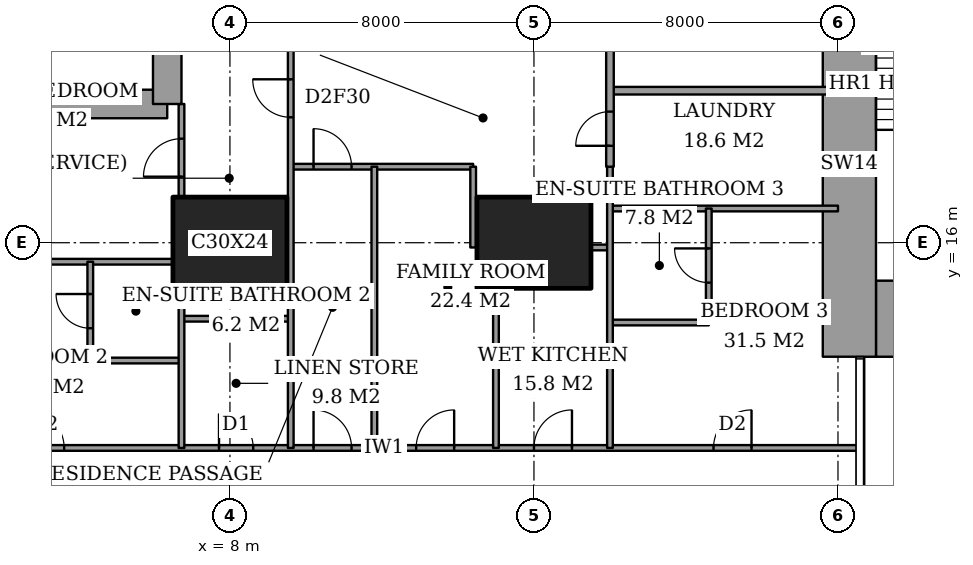
"""IFC4 building model, lengths in metres.
Left out: names, types, materials, properties, quantities, classifications, styles, units other than length and angle.
Written with IfcOpenShell. Run it as: python <this file> out.ifc"""

import sys

from ifc_helpers import new_model, si_unit, direction, frame, frame_2d, origin, origin_2d, place, context, subcontext, project, spatial, rectangle, extrude, element, fill, save


model = new_model("IFC4")
c1 = context("Model", 3, precision=1e-05, world=origin(), true_north=direction((0.0, 1.0)))
c2 = subcontext(c1, "Body", "Model", "MODEL_VIEW")
j1 = project(units=[si_unit("LENGTHUNIT", "METRE"), si_unit("PLANEANGLEUNIT", "RADIAN")], contexts=[c1])
p1 = place(None, origin())
s1 = spatial("IfcSite", under=j1, at=p1, CompositionType="ELEMENT")
p2 = place(p1, origin())
s2 = spatial("IfcBuilding", under=s1, at=p2, CompositionType="ELEMENT")
p3 = place(p2, frame((0.0, 0.0, 62.0)))
s3 = spatial("IfcBuildingStorey", under=s2, at=p3, CompositionType="ELEMENT", Elevation=62.0)
for number, where, z_axis, x_axis in (
    (1, (8.0, 16.0, 0.0), (0.0, 0.0, 1.0), (1.0, 0.0, 0.0)),
    (2, (16.0, 16.0, 0.0), (0.0, 0.0, 1.0), (1.0, 0.0, 0.0)),
):
    element("IfcColumn", number, at=place(p3, frame(where, z_axis=z_axis, x_axis=x_axis)), inside=s3, PredefinedType="COLUMN", context=c2, shape_type="SweptSolid", body=[
        extrude(rectangle(XDim=3.0, YDim=2.4, at=origin_2d()), origin(), (0.0, 0.0, 1.0), 3.6),
    ])
p4 = place(p3, frame((25.0, 14.0, 0.0), z_axis=(0.0, 0.0, 1.0), x_axis=(1.0, 0.0, 0.0)))
e3 = element("IfcWall", 3, at=p4, inside=s3, PredefinedType="SHEAR", context=c2, shape_type="SweptSolid", body=[
    extrude(rectangle(XDim=3.15, YDim=2.0, at=frame_2d((1.575, 0.0))), origin(), (0.0, 0.0, 1.0), 3.6),
])
p5 = place(p3, frame((24.3, 13.0, 0.0), z_axis=(0.0, 0.0, 1.0), x_axis=(0.0, 1.0, 0.0)))
e4 = element("IfcWall", 4, at=p5, inside=s3, PredefinedType="SHEAR", context=c2, shape_type="SweptSolid", body=[
    extrude(rectangle(XDim=10.15, YDim=1.4, at=frame_2d((5.075, 0.0))), origin(), (0.0, 0.0, 1.0), 3.6),
])
p6 = place(p3, frame((1.9, 19.65, 0.0), z_axis=(0.0, 0.0, 1.0), x_axis=(1.0, 0.0, 0.0)))
e5 = element("IfcWall", 5, at=p6, inside=s3, PredefinedType="SHEAR", context=c2, shape_type="SweptSolid", body=[
    extrude(rectangle(XDim=4.45, YDim=0.75, at=frame_2d((2.225, 0.0))), origin(), (0.0, 0.0, 1.0), 3.6),
])
p7 = place(p3, frame((6.35, 19.65, 0.0), z_axis=(0.0, 0.0, 1.0), x_axis=(0.0, 1.0, 0.0)))
e6 = element("IfcWall", 6, at=p7, inside=s3, PredefinedType="SHEAR", context=c2, shape_type="SweptSolid", body=[
    extrude(rectangle(XDim=8.7, YDim=0.75, at=frame_2d((4.35, 0.0))), origin(), (0.0, 0.0, 1.0), 3.6),
])
p8 = place(p7, frame((6.725, 0.0, 0.0)))
e7 = element("IfcOpeningElement", 7, at=p8, cuts=e6, PredefinedType="OPENING", context=c2, shape_type="SweptSolid", body=[
    extrude(rectangle(XDim=1.0, YDim=2.1, at=frame_2d((0.5, 1.05))), frame((0.0, 0.385, 0.0), z_axis=(0.0, -1.0, 0.0), x_axis=(1.0, 0.0, 0.0)), (0.0, 0.0, 1.0), 0.77),
])
p9 = place(p3, frame((-0.45, 10.6, 0.0), z_axis=(0.0, 0.0, 1.0), x_axis=(1.0, 0.0, 0.0)))
e8 = element("IfcWall", 8, at=p9, inside=s3, PredefinedType="PARTITIONING", context=c2, shape_type="SweptSolid", body=[
    extrude(rectangle(XDim=25.011, YDim=0.15, at=frame_2d((12.505, 0.0))), origin(), (0.0, 0.0, 1.0), 3.35),
])
p10 = place(p9, frame((10.65, 0.0, 0.0)))
e9 = element("IfcOpeningElement", 9, at=p10, cuts=e8, PredefinedType="OPENING", context=c2, shape_type="SweptSolid", body=[
    extrude(rectangle(XDim=1.0, YDim=2.1, at=frame_2d((0.5, 1.05))), frame((0.0, 0.085, 0.0), z_axis=(0.0, -1.0, 0.0), x_axis=(1.0, 0.0, 0.0)), (0.0, 0.0, 1.0), 0.17),
])
p11 = place(p9, frame((3.087, 0.0, 0.0)))
e10 = element("IfcOpeningElement", 10, at=p11, cuts=e8, PredefinedType="OPENING", context=c2, shape_type="SweptSolid", body=[
    extrude(rectangle(XDim=1.0, YDim=2.1, at=frame_2d((0.5, 1.05))), frame((0.0, 0.085, 0.0), z_axis=(0.0, -1.0, 0.0), x_axis=(1.0, 0.0, 0.0)), (0.0, 0.0, 1.0), 0.17),
])
p12 = place(p9, frame((8.163, 0.0, 0.0)))
e11 = element("IfcOpeningElement", 11, at=p12, cuts=e8, PredefinedType="OPENING", context=c2, shape_type="SweptSolid", body=[
    extrude(rectangle(XDim=0.9, YDim=2.1, at=frame_2d((0.45, 1.05))), frame((0.0, 0.085, 0.0), z_axis=(0.0, -1.0, 0.0), x_axis=(1.0, 0.0, 0.0)), (0.0, 0.0, 1.0), 0.17),
])
p13 = place(p9, frame((13.35, 0.0, 0.0)))
e12 = element("IfcOpeningElement", 12, at=p13, cuts=e8, PredefinedType="OPENING", context=c2, shape_type="SweptSolid", body=[
    extrude(rectangle(XDim=1.0, YDim=2.1, at=frame_2d((0.5, 1.05))), frame((0.0, 0.085, 0.0), z_axis=(0.0, -1.0, 0.0), x_axis=(1.0, 0.0, 0.0)), (0.0, 0.0, 1.0), 0.17),
])
p14 = place(p9, frame((16.45, 0.0, 0.0)))
e13 = element("IfcOpeningElement", 13, at=p14, cuts=e8, PredefinedType="OPENING", context=c2, shape_type="SweptSolid", body=[
    extrude(rectangle(XDim=1.0, YDim=2.1, at=frame_2d((0.5, 1.05))), frame((0.0, 0.085, 0.0), z_axis=(0.0, -1.0, 0.0), x_axis=(1.0, 0.0, 0.0)), (0.0, 0.0, 1.0), 0.17),
])
p15 = place(p9, frame((21.175, 0.0, 0.0)))
e14 = element("IfcOpeningElement", 14, at=p15, cuts=e8, PredefinedType="OPENING", context=c2, shape_type="SweptSolid", body=[
    extrude(rectangle(XDim=1.0, YDim=2.1, at=frame_2d((0.5, 1.05))), frame((0.0, 0.085, 0.0), z_axis=(0.0, -1.0, 0.0), x_axis=(1.0, 0.0, 0.0)), (0.0, 0.0, 1.0), 0.17),
])
p16 = place(p3, frame((4.325, 12.9, 0.0), z_axis=(0.0, 0.0, 1.0), x_axis=(1.0, 0.0, 0.0)))
e15 = element("IfcWall", 15, at=p16, inside=s3, PredefinedType="PARTITIONING", context=c2, shape_type="SweptSolid", body=[
    extrude(rectangle(XDim=2.4, YDim=0.15, at=frame_2d((1.2, 0.0))), origin(), (0.0, 0.0, 1.0), 3.35),
])
p17 = place(p3, frame((18.0, 13.9, 0.0), z_axis=(0.0, 0.0, 1.0), x_axis=(1.0, 0.0, 0.0)))
e16 = element("IfcWall", 16, at=p17, inside=s3, PredefinedType="PARTITIONING", context=c2, shape_type="SweptSolid", body=[
    extrude(rectangle(XDim=2.6, YDim=0.15, at=frame_2d((1.3, 0.0))), origin(), (0.0, 0.0, 1.0), 3.35),
])
p18 = place(p3, frame((6.725, 14.0, 0.0), z_axis=(0.0, 0.0, 1.0), x_axis=(1.0, 0.0, 0.0)))
e17 = element("IfcWall", 17, at=p18, inside=s3, PredefinedType="PARTITIONING", context=c2, shape_type="SweptSolid", body=[
    extrude(rectangle(XDim=2.875, YDim=0.15, at=frame_2d((1.438, 0.0))), origin(), (0.0, 0.0, 1.0), 3.35),
])
p19 = place(p3, frame((1.35, 15.5, 0.0), z_axis=(0.0, 0.0, 1.0), x_axis=(1.0, 0.0, 0.0)))
e18 = element("IfcWall", 18, at=p19, inside=s3, PredefinedType="PARTITIONING", context=c2, shape_type="SweptSolid", body=[
    extrude(rectangle(XDim=5.15, YDim=0.15, at=frame_2d((2.575, 0.0))), origin(), (0.0, 0.0, 1.0), 3.35),
])
p20 = place(p3, frame((17.5, 15.875, 0.0), z_axis=(0.0, 0.0, 1.0), x_axis=(1.0, 0.0, 0.0)))
e19 = element("IfcWall", 19, at=p20, inside=s3, PredefinedType="PARTITIONING", context=c2, shape_type="SweptSolid", body=[
    extrude(rectangle(XDim=0.5, YDim=0.15, at=frame_2d((0.25, 0.0))), origin(), (0.0, 0.0, 1.0), 2.634),
])
p21 = place(p3, frame((18.0, 16.9, 0.0), z_axis=(0.0, 0.0, 1.0), x_axis=(1.0, 0.0, 0.0)))
e20 = element("IfcWall", 20, at=p21, inside=s3, PredefinedType="PARTITIONING", context=c2, shape_type="SweptSolid", body=[
    extrude(rectangle(XDim=6.0, YDim=0.15, at=frame_2d((3.0, 0.0))), origin(), (0.0, 0.0, 1.0), 3.35),
])
p22 = place(p3, frame((9.6, 18.0, 0.0), z_axis=(0.0, 0.0, 1.0), x_axis=(1.0, 0.0, 0.0)))
e21 = element("IfcWall", 21, at=p22, inside=s3, PredefinedType="PARTITIONING", context=c2, shape_type="SweptSolid", body=[
    extrude(rectangle(XDim=4.8, YDim=0.15, at=frame_2d((2.4, 0.0))), origin(), (0.0, 0.0, 1.0), 3.35),
])
p23 = place(p22, frame((0.6, 0.0, 0.0)))
e22 = element("IfcOpeningElement", 22, at=p23, cuts=e21, PredefinedType="OPENING", context=c2, shape_type="SweptSolid", body=[
    extrude(rectangle(XDim=1.0, YDim=2.1, at=frame_2d((0.5, 1.05))), frame((0.0, 0.085, 0.0), z_axis=(0.0, -1.0, 0.0), x_axis=(1.0, 0.0, 0.0)), (0.0, 0.0, 1.0), 0.17),
])
p24 = place(p3, frame((18.0, 20.0, 0.0), z_axis=(0.0, 0.0, 1.0), x_axis=(1.0, 0.0, 0.0)))
e23 = element("IfcWall", 23, at=p24, inside=s3, PredefinedType="PARTITIONING", context=c2, shape_type="SweptSolid", body=[
    extrude(rectangle(XDim=6.0, YDim=0.2, at=frame_2d((3.0, 0.0))), origin(), (0.0, 0.0, 1.0), 3.35),
])
p25 = place(p3, frame((4.325, 12.9, 0.0), z_axis=(0.0, 0.0, 1.0), x_axis=(0.0, 1.0, 0.0)))
e24 = element("IfcWall", 24, at=p25, inside=s3, PredefinedType="PARTITIONING", context=c2, shape_type="SweptSolid", body=[
    extrude(rectangle(XDim=2.6, YDim=0.15, at=frame_2d((1.3, 0.0))), origin(), (0.0, 0.0, 1.0), 3.35),
])
p26 = place(p25, frame((0.85, 0.0, 0.0)))
e25 = element("IfcOpeningElement", 25, at=p26, cuts=e24, PredefinedType="OPENING", context=c2, shape_type="SweptSolid", body=[
    extrude(rectangle(XDim=0.9, YDim=2.1, at=frame_2d((0.45, 1.05))), frame((0.0, 0.085, 0.0), z_axis=(0.0, -1.0, 0.0), x_axis=(1.0, 0.0, 0.0)), (0.0, 0.0, 1.0), 0.17),
])
p27 = place(p3, frame((6.725, 10.6, 0.0), z_axis=(0.0, 0.0, 1.0), x_axis=(0.0, 1.0, 0.0)))
e26 = element("IfcWall", 26, at=p27, inside=s3, PredefinedType="PARTITIONING", context=c2, shape_type="SweptSolid", body=[
    extrude(rectangle(XDim=4.2, YDim=0.15, at=frame_2d((2.1, 0.0))), origin(), (0.0, 0.0, 1.0), 3.35),
])
p28 = place(p3, frame((6.725, 17.2, 0.0), z_axis=(0.0, 0.0, 1.0), x_axis=(0.0, 1.0, 0.0)))
e27 = element("IfcWall", 27, at=p28, inside=s3, PredefinedType="PARTITIONING", context=c2, shape_type="SweptSolid", body=[
    extrude(rectangle(XDim=2.45, YDim=0.15, at=frame_2d((1.225, 0.0))), origin(), (0.0, 0.0, 1.0), 3.35),
])
p29 = place(p28, frame((0.538, 0.0, 0.0)))
e28 = element("IfcOpeningElement", 28, at=p29, cuts=e27, PredefinedType="OPENING", context=c2, shape_type="SweptSolid", body=[
    extrude(rectangle(XDim=1.0, YDim=2.1, at=frame_2d((0.5, 1.05))), frame((0.0, 0.085, 0.0), z_axis=(0.0, -1.0, 0.0), x_axis=(1.0, 0.0, 0.0)), (0.0, 0.0, 1.0), 0.17),
])
p30 = place(p3, frame((9.6, 10.6, 0.0), z_axis=(0.0, 0.0, 1.0), x_axis=(0.0, 1.0, 0.0)))
e29 = element("IfcWall", 29, at=p30, inside=s3, PredefinedType="PARTITIONING", context=c2, shape_type="SweptSolid", body=[
    extrude(rectangle(XDim=11.0, YDim=0.15, at=frame_2d((5.5, 0.0))), origin(), (0.0, 0.0, 1.0), 3.35),
])
p31 = place(p30, frame((8.7, 0.0, 0.0)))
e30 = element("IfcOpeningElement", 30, at=p31, cuts=e29, PredefinedType="OPENING", context=c2, shape_type="SweptSolid", body=[
    extrude(rectangle(XDim=1.0, YDim=2.1, at=frame_2d((0.5, 1.05))), frame((0.0, 0.085, 0.0), z_axis=(0.0, -1.0, 0.0), x_axis=(1.0, 0.0, 0.0)), (0.0, 0.0, 1.0), 0.17),
])
p32 = place(p3, frame((11.8, 10.6, 0.0), z_axis=(0.0, 0.0, 1.0), x_axis=(0.0, 1.0, 0.0)))
e31 = element("IfcWall", 31, at=p32, inside=s3, PredefinedType="PARTITIONING", context=c2, shape_type="SweptSolid", body=[
    extrude(rectangle(XDim=7.4, YDim=0.15, at=frame_2d((3.7, 0.0))), origin(), (0.0, 0.0, 1.0), 3.35),
])
p33 = place(p3, frame((14.4, 15.875, 0.0), z_axis=(0.0, 0.0, 1.0), x_axis=(0.0, 1.0, 0.0)))
e32 = element("IfcWall", 32, at=p33, inside=s3, PredefinedType="PARTITIONING", context=c2, shape_type="SweptSolid", body=[
    extrude(rectangle(XDim=2.125, YDim=0.15, at=frame_2d((1.062, 0.0))), origin(), (0.0, 0.0, 1.0), 3.35),
])
p34 = place(p3, frame((15.0, 10.6, 0.0), z_axis=(0.0, 0.0, 1.0), x_axis=(0.0, 1.0, 0.0)))
e33 = element("IfcWall", 33, at=p34, inside=s3, PredefinedType="PARTITIONING", context=c2, shape_type="SweptSolid", body=[
    extrude(rectangle(XDim=4.2, YDim=0.15, at=frame_2d((2.1, 0.0))), origin(), (0.0, 0.0, 1.0), 3.35),
])
p35 = place(p3, frame((18.0, 18.0, 0.0), z_axis=(0.0, 0.0, 1.0), x_axis=(0.0, 1.0, 0.0)))
e34 = element("IfcWall", 34, at=p35, inside=s3, PredefinedType="PARTITIONING", context=c2, shape_type="SweptSolid", body=[
    extrude(rectangle(XDim=6.0, YDim=0.2, at=frame_2d((3.0, 0.0))), origin(), (0.0, 0.0, 1.0), 3.35),
])
p36 = place(p35, frame((3.4, 0.0, 0.0)))
e35 = element("IfcOpeningElement", 35, at=p36, cuts=e34, PredefinedType="OPENING", context=c2, shape_type="SweptSolid", body=[
    extrude(rectangle(XDim=1.2, YDim=2.4, at=frame_2d((0.6, 1.2))), frame((0.0, 0.11, 0.0), z_axis=(0.0, -1.0, 0.0), x_axis=(1.0, 0.0, 0.0)), (0.0, 0.0, 1.0), 0.22),
])
p37 = place(p35, frame((0.55, 0.0, 0.0)))
e36 = element("IfcOpeningElement", 36, at=p37, cuts=e34, PredefinedType="OPENING", context=c2, shape_type="SweptSolid", body=[
    extrude(rectangle(XDim=0.9, YDim=2.1, at=frame_2d((0.45, 1.05))), frame((0.0, 0.11, 0.0), z_axis=(0.0, -1.0, 0.0), x_axis=(1.0, 0.0, 0.0)), (0.0, 0.0, 1.0), 0.22),
])
p38 = place(p3, frame((18.0, 10.6, 0.0), z_axis=(0.0, 0.0, 1.0), x_axis=(0.0, 1.0, 0.0)))
e37 = element("IfcWall", 37, at=p38, inside=s3, PredefinedType="PARTITIONING", context=c2, shape_type="SweptSolid", body=[
    extrude(rectangle(XDim=7.4, YDim=0.15, at=frame_2d((3.7, 0.0))), origin(), (0.0, 0.0, 1.0), 3.35),
])
p39 = place(p3, frame((20.6, 13.9, 0.0), z_axis=(0.0, 0.0, 1.0), x_axis=(0.0, 1.0, 0.0)))
e38 = element("IfcWall", 38, at=p39, inside=s3, PredefinedType="PARTITIONING", context=c2, shape_type="SweptSolid", body=[
    extrude(rectangle(XDim=3.0, YDim=0.15, at=frame_2d((1.5, 0.0))), origin(), (0.0, 0.0, 1.0), 3.35),
])
p40 = place(p39, frame((1.05, 0.0, 0.0)))
e39 = element("IfcOpeningElement", 39, at=p40, cuts=e38, PredefinedType="OPENING", context=c2, shape_type="SweptSolid", body=[
    extrude(rectangle(XDim=0.9, YDim=2.1, at=frame_2d((0.45, 1.05))), frame((0.0, 0.085, 0.0), z_axis=(0.0, -1.0, 0.0), x_axis=(1.0, 0.0, 0.0)), (0.0, 0.0, 1.0), 0.17),
])
p41 = place(p10, origin())
e40 = element("IfcDoor", 40, at=p41, inside=s3, OperationType="SINGLE_SWING_RIGHT", PredefinedType="DOOR", context=c2, shape_type="SweptSolid", body=[
    extrude(rectangle(XDim=1.0, YDim=2.1, at=frame_2d((0.5, 1.05))), frame((0.0, 0.025, 0.0), z_axis=(0.0, -1.0, 0.0), x_axis=(1.0, 0.0, 0.0)), (0.0, 0.0, 1.0), 0.05),
])
fill(e9, e40)
p42 = place(p26, origin())
e41 = element("IfcDoor", 41, at=p42, inside=s3, OperationType="SINGLE_SWING_LEFT", PredefinedType="DOOR", context=c2, shape_type="SweptSolid", body=[
    extrude(rectangle(XDim=0.9, YDim=2.1, at=frame_2d((0.45, 1.05))), frame((0.0, 0.025, 0.0), z_axis=(0.0, -1.0, 0.0), x_axis=(1.0, 0.0, 0.0)), (0.0, 0.0, 1.0), 0.05),
])
fill(e25, e41)
p43 = place(p11, origin())
e42 = element("IfcDoor", 42, at=p43, inside=s3, OperationType="SINGLE_SWING_RIGHT", PredefinedType="DOOR", context=c2, shape_type="SweptSolid", body=[
    extrude(rectangle(XDim=1.0, YDim=2.1, at=frame_2d((0.5, 1.05))), frame((0.0, 0.025, 0.0), z_axis=(0.0, -1.0, 0.0), x_axis=(1.0, 0.0, 0.0)), (0.0, 0.0, 1.0), 0.05),
])
fill(e10, e42)
p44 = place(p29, origin())
e43 = element("IfcDoor", 43, at=p44, inside=s3, OperationType="SINGLE_SWING_RIGHT", PredefinedType="DOOR", context=c2, shape_type="SweptSolid", body=[
    extrude(rectangle(XDim=1.0, YDim=2.1, at=frame_2d((0.5, 1.05))), frame((0.0, 0.025, 0.0), z_axis=(0.0, -1.0, 0.0), x_axis=(1.0, 0.0, 0.0)), (0.0, 0.0, 1.0), 0.05),
])
fill(e28, e43)
p45 = place(p12, origin())
e44 = element("IfcDoor", 44, at=p45, inside=s3, OperationType="SINGLE_SWING_RIGHT", PredefinedType="DOOR", context=c2, shape_type="SweptSolid", body=[
    extrude(rectangle(XDim=0.9, YDim=2.1, at=frame_2d((0.45, 1.05))), frame((0.0, 0.025, 0.0), z_axis=(0.0, -1.0, 0.0), x_axis=(1.0, 0.0, 0.0)), (0.0, 0.0, 1.0), 0.05),
])
fill(e11, e44)
p46 = place(p31, origin())
e45 = element("IfcDoor", 45, at=p46, inside=s3, OperationType="SINGLE_SWING_LEFT", PredefinedType="DOOR", context=c2, shape_type="SweptSolid", body=[
    extrude(rectangle(XDim=1.0, YDim=2.1, at=frame_2d((0.5, 1.05))), frame((0.0, 0.025, 0.0), z_axis=(0.0, -1.0, 0.0), x_axis=(1.0, 0.0, 0.0)), (0.0, 0.0, 1.0), 0.05),
])
fill(e30, e45)
p47 = place(p23, origin())
e46 = element("IfcDoor", 46, at=p47, inside=s3, OperationType="SINGLE_SWING_RIGHT", PredefinedType="DOOR", context=c2, shape_type="SweptSolid", body=[
    extrude(rectangle(XDim=1.0, YDim=2.1, at=frame_2d((0.5, 1.05))), frame((0.0, 0.025, 0.0), z_axis=(0.0, -1.0, 0.0), x_axis=(1.0, 0.0, 0.0)), (0.0, 0.0, 1.0), 0.05),
])
fill(e22, e46)
p48 = place(p13, origin())
e47 = element("IfcDoor", 47, at=p48, inside=s3, OperationType="SINGLE_SWING_LEFT", PredefinedType="DOOR", context=c2, shape_type="SweptSolid", body=[
    extrude(rectangle(XDim=1.0, YDim=2.1, at=frame_2d((0.5, 1.05))), frame((0.0, 0.025, 0.0), z_axis=(0.0, -1.0, 0.0), x_axis=(1.0, 0.0, 0.0)), (0.0, 0.0, 1.0), 0.05),
])
fill(e12, e47)
p49 = place(p14, origin())
e48 = element("IfcDoor", 48, at=p49, inside=s3, OperationType="SINGLE_SWING_LEFT", PredefinedType="DOOR", context=c2, shape_type="SweptSolid", body=[
    extrude(rectangle(XDim=1.0, YDim=2.1, at=frame_2d((0.5, 1.05))), frame((0.0, 0.025, 0.0), z_axis=(0.0, -1.0, 0.0), x_axis=(1.0, 0.0, 0.0)), (0.0, 0.0, 1.0), 0.05),
])
fill(e13, e48)
p50 = place(p40, origin())
e49 = element("IfcDoor", 49, at=p50, inside=s3, OperationType="SINGLE_SWING_LEFT", PredefinedType="DOOR", context=c2, shape_type="SweptSolid", body=[
    extrude(rectangle(XDim=0.9, YDim=2.1, at=frame_2d((0.45, 1.05))), frame((0.0, 0.025, 0.0), z_axis=(0.0, -1.0, 0.0), x_axis=(1.0, 0.0, 0.0)), (0.0, 0.0, 1.0), 0.05),
])
fill(e39, e49)
p51 = place(p15, origin())
e50 = element("IfcDoor", 50, at=p51, inside=s3, OperationType="SINGLE_SWING_LEFT", PredefinedType="DOOR", context=c2, shape_type="SweptSolid", body=[
    extrude(rectangle(XDim=1.0, YDim=2.1, at=frame_2d((0.5, 1.05))), frame((0.0, 0.025, 0.0), z_axis=(0.0, -1.0, 0.0), x_axis=(1.0, 0.0, 0.0)), (0.0, 0.0, 1.0), 0.05),
])
fill(e14, e50)
p52 = place(p37, origin())
e51 = element("IfcDoor", 51, at=p52, inside=s3, OperationType="SINGLE_SWING_RIGHT", PredefinedType="DOOR", context=c2, shape_type="SweptSolid", body=[
    extrude(rectangle(XDim=0.9, YDim=2.1, at=frame_2d((0.45, 1.05))), frame((0.0, 0.025, 0.0), z_axis=(0.0, -1.0, 0.0), x_axis=(1.0, 0.0, 0.0)), (0.0, 0.0, 1.0), 0.05),
])
fill(e36, e51)
save(model, sys.argv[1])
